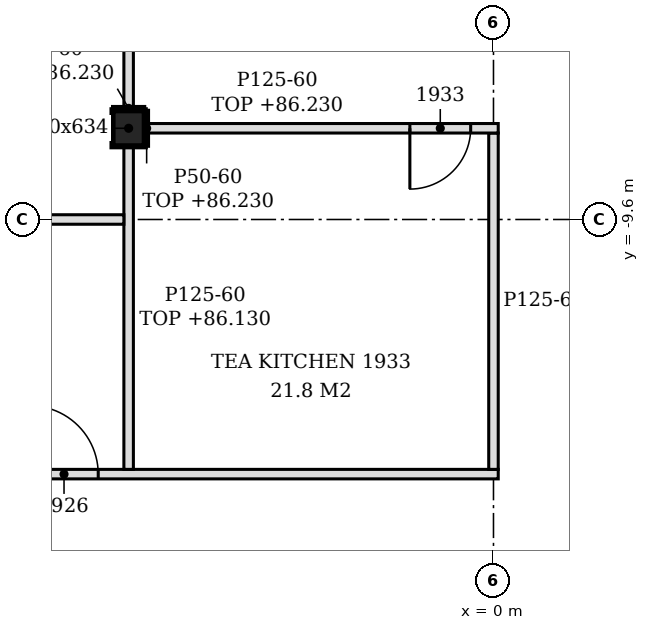
"""IFC4 building model, lengths in metres.
Left out: names, types, materials, properties, quantities, classifications, styles, units other than length and angle.
Written with IfcOpenShell. Run it as: python <this file> out.ifc"""

import sys

from ifc_helpers import new_model, si_unit, direction, frame, frame_2d, origin, origin_2d, place, context, subcontext, project, spatial, polyline, rectangle, i_section, outline, extrude, element, fill, save


model = new_model("IFC4")
c1 = context("Model", 3, precision=1e-05, world=origin(), true_north=direction((0.0, 1.0)))
c2 = subcontext(c1, "Body", "Model", "MODEL_VIEW")
j1 = project(units=[si_unit("LENGTHUNIT", "METRE"), si_unit("PLANEANGLEUNIT", "RADIAN")], contexts=[c1])
p1 = place(None, origin())
s1 = spatial("IfcSite", under=j1, at=p1, CompositionType="ELEMENT")
p2 = place(p1, origin())
s2 = spatial("IfcBuilding", under=s1, at=p2, CompositionType="ELEMENT")
p3 = place(p2, frame((0.0, 0.0, 83.4)))
s3 = spatial("IfcBuildingStorey", under=s2, at=p3, CompositionType="ELEMENT", Elevation=83.4)
p4 = place(p3, frame((-4.8, -8.4, -0.15), z_axis=(0.0, 0.0, 1.0), x_axis=(1.0, 0.0, 0.0)))
e1 = element("IfcColumn", 1, at=p4, inside=s3, PredefinedType="COLUMN", context=c2, shape_type="SweptSolid", body=[
    extrude(i_section(OverallWidth=0.424, OverallDepth=0.474, WebThickness=0.048, FlangeThickness=0.077, FilletRadius=0.015, at=origin_2d()), origin(), (0.0, 0.0, 1.0), 3.6),
])
p5 = place(p3, frame((-20.413, -12.95, 0.0), z_axis=(0.0, 0.0, 1.0), x_axis=(1.0, 0.0, 0.0)))
e2 = element("IfcWall", 2, at=p5, inside=s3, PredefinedType="PARTITIONING", context=c2, shape_type="SweptSolid", body=[
    extrude(outline(polyline([(0.0, 0.0), (20.475, 0.0), (20.475, 3.45), (15.762, 3.45), (15.76, 2.73), (15.462, 2.73), (15.46, 3.45), (6.163, 3.45), (6.16, 2.93), (5.863, 2.93), (5.861, 3.45), (0.0, 3.45), (0.0, 0.0)])), frame((0.0, 0.062, 0.0), z_axis=(0.0, -1.0, 0.0), x_axis=(1.0, 0.0, 0.0)), (0.0, 0.0, 1.0), 0.125),
])
p6 = place(p5, frame((14.312, 0.0, 0.0)))
e3 = element("IfcOpeningElement", 3, at=p6, cuts=e2, PredefinedType="OPENING", context=c2, shape_type="SweptSolid", body=[
    extrude(rectangle(XDim=0.9, YDim=2.1, at=frame_2d((0.45, 1.05))), frame((0.0, 0.073, 0.0), z_axis=(0.0, -1.0, 0.0), x_axis=(1.0, 0.0, 0.0)), (0.0, 0.0, 1.0), 0.145),
])
p7 = place(p3, frame((-4.8, -12.887, 0.0), z_axis=(0.0, 0.0, 1.0), x_axis=(0.0, 1.0, 0.0)))
e4 = element("IfcWall", 4, at=p7, inside=s3, PredefinedType="PARTITIONING", context=c2, shape_type="SweptSolid", body=[
    extrude(rectangle(XDim=4.25, YDim=0.125, at=frame_2d((2.125, 0.0))), origin(), (0.0, 0.0, 1.0), 2.73),
])
p8 = place(p3, frame((0.0, -12.887, 0.0), z_axis=(0.0, 0.0, 1.0), x_axis=(0.0, 1.0, 0.0)))
e5 = element("IfcWall", 5, at=p8, inside=s3, PredefinedType="PARTITIONING", context=c2, shape_type="SweptSolid", body=[
    extrude(outline(polyline([(0.0, 0.0), (4.425, 0.0), (4.425, 2.83), (4.337, 2.83), (4.335, 3.45), (0.0, 3.45), (0.0, 0.0)])), frame((0.0, 0.062, 0.0), z_axis=(0.0, -1.0, 0.0), x_axis=(1.0, 0.0, 0.0)), (0.0, 0.0, 1.0), 0.125),
])
p9 = place(p3, frame((-14.196, -9.6, 0.0), z_axis=(0.0, 0.0, 1.0), x_axis=(1.0, 0.0, 0.0)))
e6 = element("IfcWall", 6, at=p9, inside=s3, PredefinedType="PARTITIONING", context=c2, shape_type="SweptSolid", body=[
    extrude(outline(polyline([(0.0, 0.0), (9.333, 0.0), (9.333, 2.73), (9.246, 2.73), (9.243, 2.93), (0.0, 2.93), (0.0, 0.0)])), frame((0.0, 0.062, 0.0), z_axis=(0.0, -1.0, 0.0), x_axis=(1.0, 0.0, 0.0)), (0.0, 0.0, 1.0), 0.125),
])
p10 = place(p3, frame((-4.588, -8.4, 0.0), z_axis=(0.0, 0.0, 1.0), x_axis=(1.0, 0.0, 0.0)))
e7 = element("IfcWall", 7, at=p10, inside=s3, PredefinedType="PARTITIONING", context=c2, shape_type="SweptSolid", body=[
    extrude(rectangle(XDim=4.65, YDim=0.125, at=frame_2d((2.325, 0.0))), origin(), (0.0, 0.0, 1.0), 2.83),
])
p11 = place(p10, frame((3.488, 0.0, 0.0)))
e8 = element("IfcOpeningElement", 8, at=p11, cuts=e7, PredefinedType="OPENING", context=c2, shape_type="SweptSolid", body=[
    extrude(rectangle(XDim=0.8, YDim=2.1, at=frame_2d((0.4, 1.05))), frame((0.0, 0.073, 0.0), z_axis=(0.0, -1.0, 0.0), x_axis=(1.0, 0.0, 0.0)), (0.0, 0.0, 1.0), 0.145),
])
p12 = place(p3, frame((-4.8, -8.163, 0.0), z_axis=(0.0, 0.0, 1.0), x_axis=(0.0, 1.0, 0.0)))
e9 = element("IfcWall", 9, at=p12, inside=s3, PredefinedType="PARTITIONING", context=c2, shape_type="SweptSolid", body=[
    extrude(rectangle(XDim=8.101, YDim=0.125, at=frame_2d((4.05, 0.0))), origin(), (0.0, 0.0, 1.0), 2.83),
])
p13 = place(p12, frame((2.163, 0.0, 0.0)))
e10 = element("IfcOpeningElement", 10, at=p13, cuts=e9, PredefinedType="OPENING", context=c2, shape_type="SweptSolid", body=[
    extrude(rectangle(XDim=0.9, YDim=2.1, at=frame_2d((0.45, 1.05))), frame((0.0, 0.073, 0.0), z_axis=(0.0, -1.0, 0.0), x_axis=(1.0, 0.0, 0.0)), (0.0, 0.0, 1.0), 0.145),
])
p14 = place(p3, frame((-4.563, -8.637, 0.0), z_axis=(0.0, 0.0, 1.0), x_axis=(0.0, 1.0, 0.0)))
e11 = element("IfcWall", 11, at=p14, inside=s3, PredefinedType="PARTITIONING", context=c2, shape_type="SweptSolid", body=[
    extrude(rectangle(XDim=0.474, YDim=0.05, at=frame_2d((0.237, 0.0))), origin(), (0.0, 0.0, 1.0), 2.83),
])
p15 = place(p3, frame((-5.012, -8.138, 0.0), z_axis=(0.0, 0.0, 1.0), x_axis=(1.0, 0.0, 0.0)))
e12 = element("IfcWall", 12, at=p15, inside=s3, PredefinedType="PARTITIONING", context=c2, shape_type="SweptSolid", body=[
    extrude(rectangle(XDim=0.424, YDim=0.05, at=frame_2d((0.212, 0.0))), origin(), (0.0, 0.0, 1.0), 2.83),
])
p16 = place(p6, origin())
e13 = element("IfcDoor", 13, at=p16, inside=s3, OperationType="SINGLE_SWING_LEFT", PredefinedType="DOOR", context=c2, shape_type="SweptSolid", body=[
    extrude(rectangle(XDim=0.9, YDim=2.1, at=frame_2d((0.45, 1.05))), frame((0.0, 0.025, 0.0), z_axis=(0.0, -1.0, 0.0), x_axis=(1.0, 0.0, 0.0)), (0.0, 0.0, 1.0), 0.05),
])
fill(e3, e13)
p17 = place(p11, frame((0.8, 0.0, 0.0), z_axis=(0.0, 0.0, 1.0), x_axis=(-1.0, 0.0, 0.0)))
e14 = element("IfcDoor", 14, at=p17, inside=s3, OperationType="SINGLE_SWING_RIGHT", PredefinedType="DOOR", context=c2, shape_type="SweptSolid", body=[
    extrude(rectangle(XDim=0.8, YDim=2.1, at=frame_2d((0.4, 1.05))), frame((0.0, 0.025, 0.0), z_axis=(0.0, -1.0, 0.0), x_axis=(1.0, 0.0, 0.0)), (0.0, 0.0, 1.0), 0.05),
])
fill(e8, e14)
save(model, sys.argv[1])
